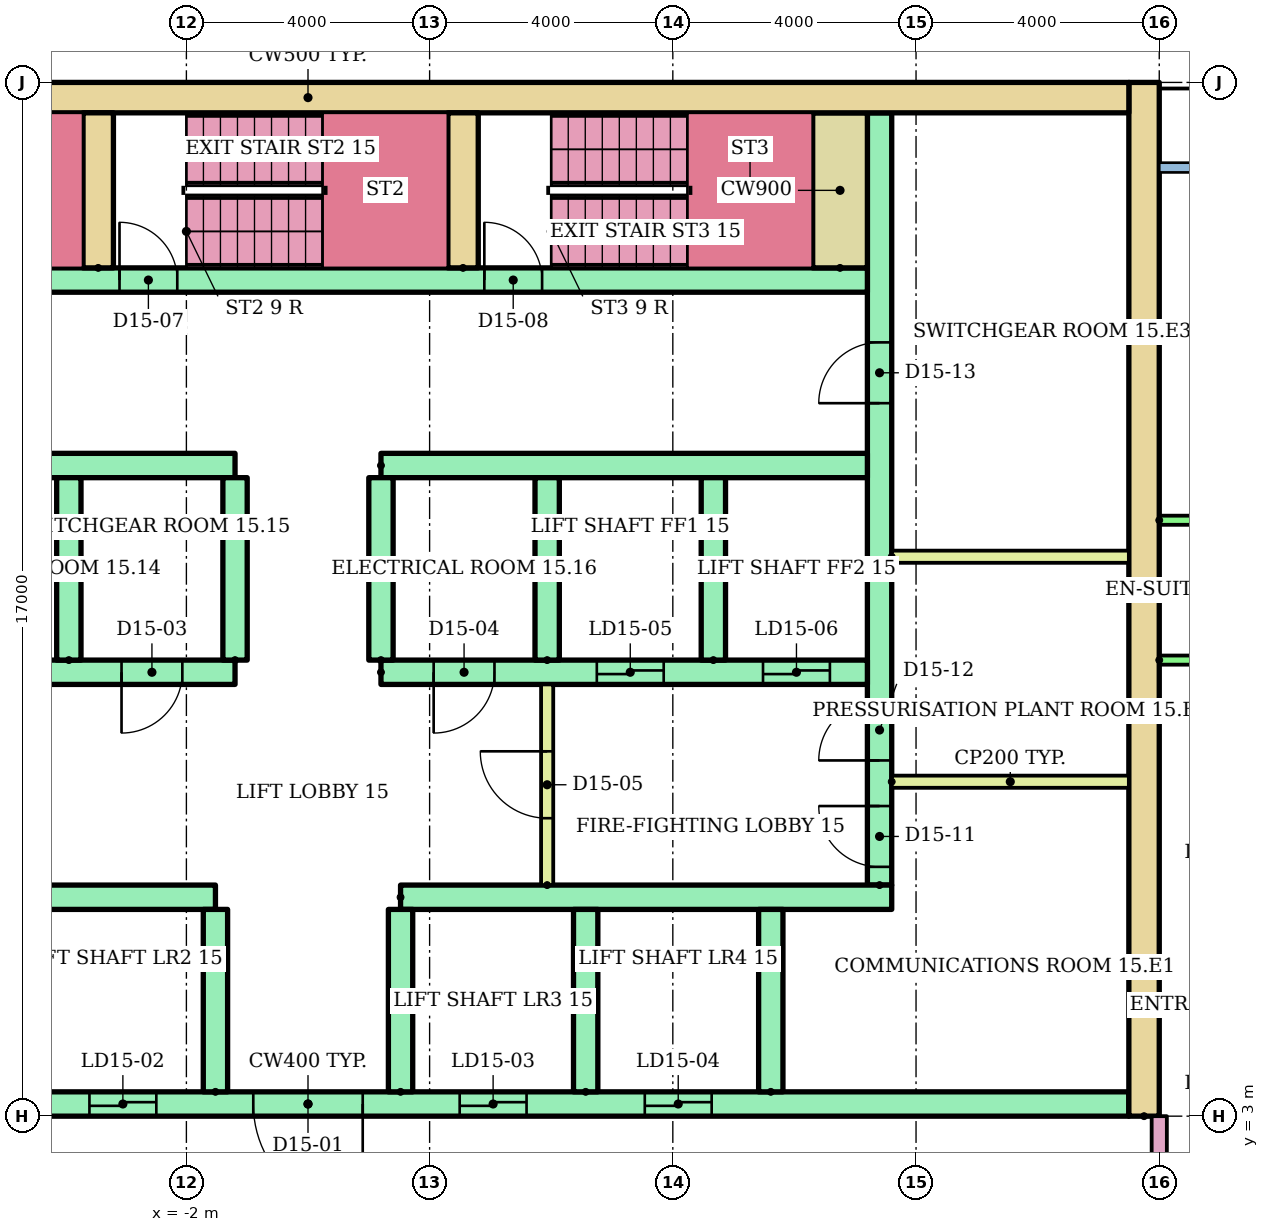
"""IFC4 building model, lengths in metres.
Left out: names, types, materials, properties, quantities, classifications, styles, units other than length and angle.
Written with IfcOpenShell. Run it as: python <this file> out.ifc"""

import sys

from ifc_helpers import new_model, si_unit, direction, frame, frame_2d, origin, place, context, subcontext, project, spatial, rectangle, extrude, element, fill, save


model = new_model("IFC4")
c1 = context("Model", 3, precision=1e-05, world=origin(), true_north=direction((0.0, 1.0)))
c2 = subcontext(c1, "Body", "Model", "MODEL_VIEW")
j1 = project(units=[si_unit("LENGTHUNIT", "METRE"), si_unit("PLANEANGLEUNIT", "RADIAN")], contexts=[c1])
p1 = place(None, origin())
s1 = spatial("IfcSite", under=j1, at=p1, CompositionType="ELEMENT")
p2 = place(p1, origin())
s2 = spatial("IfcBuilding", under=s1, at=p2, CompositionType="ELEMENT")
p3 = place(p2, frame((0.0, 0.0, 57.6)))
s3 = spatial("IfcBuildingStorey", under=s2, at=p3, CompositionType="ELEMENT", Elevation=57.6)
p4 = place(p3, frame((13.75, 3.0, 0.0), z_axis=(0.0, 0.0, 1.0), x_axis=(0.0, 1.0, 0.0)))
e1 = element("IfcWall", 1, at=p4, inside=s3, PredefinedType="SHEAR", context=c2, shape_type="SweptSolid", body=[
    extrude(rectangle(XDim=17.0, YDim=0.5, at=frame_2d((8.5, 0.0))), origin(), (0.0, 0.0, 1.0), 2.92),
])
p5 = place(p3, frame((-13.5, 19.75, 0.0)))
e2 = element("IfcWall", 2, at=p5, inside=s3, PredefinedType="SHEAR", context=c2, shape_type="SweptSolid", body=[
    extrude(rectangle(XDim=27.0, YDim=0.5, at=frame_2d((13.5, 0.0))), origin(), (0.0, 0.0, 1.0), 2.92),
])
p6 = place(p3, frame((9.4, 6.8, 0.0), z_axis=(0.0, 0.0, 1.0), x_axis=(0.0, 1.0, 0.0)))
e3 = element("IfcWall", 3, at=p6, inside=s3, PredefinedType="SHEAR", context=c2, shape_type="SweptSolid", body=[
    extrude(rectangle(XDim=12.7, YDim=0.4, at=frame_2d((6.35, 0.0))), origin(), (0.0, 0.0, 1.0), 2.92),
])
p7 = place(p6, frame((0.3, 0.0, 0.0)))
e4 = element("IfcOpeningElement", 4, at=p7, cuts=e3, PredefinedType="OPENING", context=c2, shape_type="SweptSolid", body=[
    extrude(rectangle(XDim=1.0, YDim=2.1, at=frame_2d((0.5, 1.05))), frame((0.0, 0.21, 0.0), z_axis=(0.0, -1.0, 0.0), x_axis=(1.0, 0.0, 0.0)), (0.0, 0.0, 1.0), 0.42),
])
p8 = place(p6, frame((2.05, 0.0, 0.0)))
e5 = element("IfcOpeningElement", 5, at=p8, cuts=e3, PredefinedType="OPENING", context=c2, shape_type="SweptSolid", body=[
    extrude(rectangle(XDim=1.0, YDim=2.1, at=frame_2d((0.5, 1.05))), frame((0.0, 0.21, 0.0), z_axis=(0.0, -1.0, 0.0), x_axis=(1.0, 0.0, 0.0)), (0.0, 0.0, 1.0), 0.42),
])
p9 = place(p6, frame((7.925, 0.0, 0.0)))
e6 = element("IfcOpeningElement", 6, at=p9, cuts=e3, PredefinedType="OPENING", context=c2, shape_type="SweptSolid", body=[
    extrude(rectangle(XDim=1.0, YDim=2.1, at=frame_2d((0.5, 1.05))), frame((0.0, 0.21, 0.0), z_axis=(0.0, -1.0, 0.0), x_axis=(1.0, 0.0, 0.0)), (0.0, 0.0, 1.0), 0.42),
])
p10 = place(p3, frame((-13.5, 3.2, 0.0)))
e7 = element("IfcWall", 7, at=p10, inside=s3, PredefinedType="SHEAR", context=c2, shape_type="SweptSolid", body=[
    extrude(rectangle(XDim=27.0, YDim=0.4, at=frame_2d((13.5, 0.0))), origin(), (0.0, 0.0, 1.0), 2.92),
])
p11 = place(p10, frame((6.861, 0.0, 0.0)))
e8 = element("IfcOpeningElement", 8, at=p11, cuts=e7, PredefinedType="OPENING", context=c2, shape_type="SweptSolid", body=[
    extrude(rectangle(XDim=1.1, YDim=2.1, at=frame_2d((0.55, 1.05))), frame((0.0, 0.21, 0.0), z_axis=(0.0, -1.0, 0.0), x_axis=(1.0, 0.0, 0.0)), (0.0, 0.0, 1.0), 0.42),
])
p12 = place(p10, frame((9.906, 0.0, 0.0)))
e9 = element("IfcOpeningElement", 9, at=p12, cuts=e7, PredefinedType="OPENING", context=c2, shape_type="SweptSolid", body=[
    extrude(rectangle(XDim=1.1, YDim=2.1, at=frame_2d((0.55, 1.05))), frame((0.0, 0.21, 0.0), z_axis=(0.0, -1.0, 0.0), x_axis=(1.0, 0.0, 0.0)), (0.0, 0.0, 1.0), 0.42),
])
p13 = place(p10, frame((15.994, 0.0, 0.0)))
e10 = element("IfcOpeningElement", 10, at=p13, cuts=e7, PredefinedType="OPENING", context=c2, shape_type="SweptSolid", body=[
    extrude(rectangle(XDim=1.1, YDim=2.1, at=frame_2d((0.55, 1.05))), frame((0.0, 0.21, 0.0), z_axis=(0.0, -1.0, 0.0), x_axis=(1.0, 0.0, 0.0)), (0.0, 0.0, 1.0), 0.42),
])
p14 = place(p10, frame((19.039, 0.0, 0.0)))
e11 = element("IfcOpeningElement", 11, at=p14, cuts=e7, PredefinedType="OPENING", context=c2, shape_type="SweptSolid", body=[
    extrude(rectangle(XDim=1.1, YDim=2.1, at=frame_2d((0.55, 1.05))), frame((0.0, 0.21, 0.0), z_axis=(0.0, -1.0, 0.0), x_axis=(1.0, 0.0, 0.0)), (0.0, 0.0, 1.0), 0.42),
])
p15 = place(p10, frame((12.6, 0.0, 0.0)))
e12 = element("IfcOpeningElement", 12, at=p15, cuts=e7, PredefinedType="OPENING", context=c2, shape_type="SweptSolid", body=[
    extrude(rectangle(XDim=1.8, YDim=2.1, at=frame_2d((0.9, 1.05))), frame((0.0, 0.21, 0.0), z_axis=(0.0, -1.0, 0.0), x_axis=(1.0, 0.0, 0.0)), (0.0, 0.0, 1.0), 0.42),
])
p16 = place(p3, frame((-13.5, 6.6, 0.0)))
e13 = element("IfcWall", 13, at=p16, inside=s3, PredefinedType="SHEAR", context=c2, shape_type="SweptSolid", body=[
    extrude(rectangle(XDim=11.978, YDim=0.4, at=frame_2d((5.989, 0.0))), origin(), (0.0, 0.0, 1.0), 2.92),
])
p17 = place(p3, frame((1.522, 6.6, 0.0)))
e14 = element("IfcWall", 14, at=p17, inside=s3, PredefinedType="SHEAR", context=c2, shape_type="SweptSolid", body=[
    extrude(rectangle(XDim=8.078, YDim=0.4, at=frame_2d((4.039, 0.0))), origin(), (0.0, 0.0, 1.0), 2.92),
])
for number, where, z_axis, x_axis in (
    (15, (-1.522, 3.4, 0.0), (0.0, 0.0, 1.0), (0.0, 1.0, 0.0)),
    (16, (1.522, 3.4, 0.0), (0.0, 0.0, 1.0), (0.0, 1.0, 0.0)),
    (17, (4.567, 3.4, 0.0), (0.0, 0.0, 1.0), (0.0, 1.0, 0.0)),
    (18, (7.611, 3.4, 0.0), (0.0, 0.0, 1.0), (0.0, 1.0, 0.0)),
):
    element("IfcWall", number, at=place(p3, frame(where, z_axis=z_axis, x_axis=x_axis)), inside=s3, PredefinedType="SHEAR", context=c2, shape_type="SweptSolid", body=[
        extrude(rectangle(XDim=3.0, YDim=0.4, at=frame_2d((1.5, 0.0))), origin(), (0.0, 0.0, 1.0), 2.92),
    ])
p18 = place(p3, frame((-9.2, 10.3, 0.0)))
e19 = element("IfcWall", 19, at=p18, inside=s3, PredefinedType="SHEAR", context=c2, shape_type="SweptSolid", body=[
    extrude(rectangle(XDim=8.0, YDim=0.4, at=frame_2d((4.0, 0.0))), origin(), (0.0, 0.0, 1.0), 2.92),
])
p19 = place(p18, frame((2.033, 0.0, 0.0)))
e20 = element("IfcOpeningElement", 20, at=p19, cuts=e19, PredefinedType="OPENING", context=c2, shape_type="SweptSolid", body=[
    extrude(rectangle(XDim=1.0, YDim=2.1, at=frame_2d((0.5, 1.05))), frame((0.0, 0.21, 0.0), z_axis=(0.0, -1.0, 0.0), x_axis=(1.0, 0.0, 0.0)), (0.0, 0.0, 1.0), 0.42),
])
p20 = place(p18, frame((6.133, 0.0, 0.0)))
e21 = element("IfcOpeningElement", 21, at=p20, cuts=e19, PredefinedType="OPENING", context=c2, shape_type="SweptSolid", body=[
    extrude(rectangle(XDim=1.0, YDim=2.1, at=frame_2d((0.5, 1.05))), frame((0.0, 0.21, 0.0), z_axis=(0.0, -1.0, 0.0), x_axis=(1.0, 0.0, 0.0)), (0.0, 0.0, 1.0), 0.42),
])
p21 = place(p3, frame((-9.2, 13.7, 0.0)))
e22 = element("IfcWall", 22, at=p21, inside=s3, PredefinedType="SHEAR", context=c2, shape_type="SweptSolid", body=[
    extrude(rectangle(XDim=8.0, YDim=0.4, at=frame_2d((4.0, 0.0))), origin(), (0.0, 0.0, 1.0), 2.92),
])
p22 = place(p3, frame((1.2, 10.3, 0.0)))
e23 = element("IfcWall", 23, at=p22, inside=s3, PredefinedType="SHEAR", context=c2, shape_type="SweptSolid", body=[
    extrude(rectangle(XDim=8.0, YDim=0.4, at=frame_2d((4.0, 0.0))), origin(), (0.0, 0.0, 1.0), 2.92),
])
p23 = place(p22, frame((3.55, 0.0, 0.0)))
e24 = element("IfcOpeningElement", 24, at=p23, cuts=e23, PredefinedType="OPENING", context=c2, shape_type="SweptSolid", body=[
    extrude(rectangle(XDim=1.1, YDim=2.1, at=frame_2d((0.55, 1.05))), frame((0.0, 0.21, 0.0), z_axis=(0.0, -1.0, 0.0), x_axis=(1.0, 0.0, 0.0)), (0.0, 0.0, 1.0), 0.42),
])
p24 = place(p22, frame((6.283, 0.0, 0.0)))
e25 = element("IfcOpeningElement", 25, at=p24, cuts=e23, PredefinedType="OPENING", context=c2, shape_type="SweptSolid", body=[
    extrude(rectangle(XDim=1.1, YDim=2.1, at=frame_2d((0.55, 1.05))), frame((0.0, 0.21, 0.0), z_axis=(0.0, -1.0, 0.0), x_axis=(1.0, 0.0, 0.0)), (0.0, 0.0, 1.0), 0.42),
])
p25 = place(p22, frame((0.867, 0.0, 0.0)))
e26 = element("IfcOpeningElement", 26, at=p25, cuts=e23, PredefinedType="OPENING", context=c2, shape_type="SweptSolid", body=[
    extrude(rectangle(XDim=1.0, YDim=2.1, at=frame_2d((0.5, 1.05))), frame((0.0, 0.21, 0.0), z_axis=(0.0, -1.0, 0.0), x_axis=(1.0, 0.0, 0.0)), (0.0, 0.0, 1.0), 0.42),
])
p26 = place(p3, frame((1.2, 13.7, 0.0)))
e27 = element("IfcWall", 27, at=p26, inside=s3, PredefinedType="SHEAR", context=c2, shape_type="SweptSolid", body=[
    extrude(rectangle(XDim=8.0, YDim=0.4, at=frame_2d((4.0, 0.0))), origin(), (0.0, 0.0, 1.0), 2.92),
])
for number, where, z_axis, x_axis in (
    (28, (-3.933, 10.5, 0.0), (0.0, 0.0, 1.0), (0.0, 1.0, 0.0)),
    (29, (-1.2, 10.5, 0.0), (0.0, 0.0, 1.0), (0.0, 1.0, 0.0)),
    (30, (1.2, 10.5, 0.0), (0.0, 0.0, 1.0), (0.0, 1.0, 0.0)),
    (31, (3.933, 10.5, 0.0), (0.0, 0.0, 1.0), (0.0, 1.0, 0.0)),
    (32, (6.667, 10.5, 0.0), (0.0, 0.0, 1.0), (0.0, 1.0, 0.0)),
):
    element("IfcWall", number, at=place(p3, frame(where, z_axis=z_axis, x_axis=x_axis)), inside=s3, PredefinedType="SHEAR", context=c2, shape_type="SweptSolid", body=[
        extrude(rectangle(XDim=3.0, YDim=0.4, at=frame_2d((1.5, 0.0))), origin(), (0.0, 0.0, 1.0), 2.92),
    ])
p27 = place(p3, frame((3.933, 6.8, 0.0), z_axis=(0.0, 0.0, 1.0), x_axis=(0.0, 1.0, 0.0)))
e33 = element("IfcWall", 33, at=p27, inside=s3, PredefinedType="PARTITIONING", context=c2, shape_type="SweptSolid", body=[
    extrude(rectangle(XDim=3.3, YDim=0.2, at=frame_2d((1.65, 0.0))), origin(), (0.0, 0.0, 1.0), 2.92),
])
p28 = place(p27, frame((1.1, 0.0, 0.0)))
e34 = element("IfcOpeningElement", 34, at=p28, cuts=e33, PredefinedType="OPENING", context=c2, shape_type="SweptSolid", body=[
    extrude(rectangle(XDim=1.1, YDim=2.1, at=frame_2d((0.55, 1.05))), frame((0.0, 0.11, 0.0), z_axis=(0.0, -1.0, 0.0), x_axis=(1.0, 0.0, 0.0)), (0.0, 0.0, 1.0), 0.22),
])
p29 = place(p3, frame((-9.2, 16.75, 0.0)))
e35 = element("IfcWall", 35, at=p29, inside=s3, PredefinedType="SHEAR", context=c2, shape_type="SweptSolid", body=[
    extrude(rectangle(XDim=18.4, YDim=0.4, at=frame_2d((9.2, 0.0))), origin(), (0.0, 0.0, 1.0), 2.92),
])
p30 = place(p29, frame((0.1, 0.0, 0.0)))
e36 = element("IfcOpeningElement", 36, at=p30, cuts=e35, PredefinedType="OPENING", context=c2, shape_type="SweptSolid", body=[
    extrude(rectangle(XDim=0.95, YDim=2.1, at=frame_2d((0.475, 1.05))), frame((0.0, 0.21, 0.0), z_axis=(0.0, -1.0, 0.0), x_axis=(1.0, 0.0, 0.0)), (0.0, 0.0, 1.0), 0.42),
])
p31 = place(p29, frame((6.1, 0.0, 0.0)))
e37 = element("IfcOpeningElement", 37, at=p31, cuts=e35, PredefinedType="OPENING", context=c2, shape_type="SweptSolid", body=[
    extrude(rectangle(XDim=0.95, YDim=2.1, at=frame_2d((0.475, 1.05))), frame((0.0, 0.21, 0.0), z_axis=(0.0, -1.0, 0.0), x_axis=(1.0, 0.0, 0.0)), (0.0, 0.0, 1.0), 0.42),
])
p32 = place(p29, frame((12.1, 0.0, 0.0)))
e38 = element("IfcOpeningElement", 38, at=p32, cuts=e35, PredefinedType="OPENING", context=c2, shape_type="SweptSolid", body=[
    extrude(rectangle(XDim=0.95, YDim=2.1, at=frame_2d((0.475, 1.05))), frame((0.0, 0.21, 0.0), z_axis=(0.0, -1.0, 0.0), x_axis=(1.0, 0.0, 0.0)), (0.0, 0.0, 1.0), 0.42),
])
for number, where, z_axis, x_axis in (
    (39, (-3.45, 16.95, 0.0), (0.0, 0.0, 1.0), (0.0, 1.0, 0.0)),
    (40, (2.55, 16.95, 0.0), (0.0, 0.0, 1.0), (0.0, 1.0, 0.0)),
):
    element("IfcWall", number, at=place(p3, frame(where, z_axis=z_axis, x_axis=x_axis)), inside=s3, PredefinedType="SHEAR", context=c2, shape_type="SweptSolid", body=[
        extrude(rectangle(XDim=2.55, YDim=0.5, at=frame_2d((1.275, 0.0))), origin(), (0.0, 0.0, 1.0), 2.92),
    ])
p33 = place(p3, frame((8.75, 16.95, 0.0), z_axis=(0.0, 0.0, 1.0), x_axis=(0.0, 1.0, 0.0)))
e41 = element("IfcWall", 41, at=p33, inside=s3, PredefinedType="SHEAR", context=c2, shape_type="SweptSolid", body=[
    extrude(rectangle(XDim=2.55, YDim=0.9, at=frame_2d((1.275, 0.0))), origin(), (0.0, 0.0, 1.0), 2.92),
])
for number, where in (
    (42, (9.6, 8.5, 0.0)),
    (43, (9.6, 12.2, 0.0)),
):
    element("IfcWall", number, at=place(p3, frame(where)), inside=s3, PredefinedType="PARTITIONING", context=c2, shape_type="SweptSolid", body=[
        extrude(rectangle(XDim=3.9, YDim=0.2, at=frame_2d((1.95, 0.0))), origin(), (0.0, 0.0, 1.0), 2.92),
    ])
p34 = place(p3, frame((14.0, 10.5, 0.0)))
e44 = element("IfcWall", 44, at=p34, inside=s3, PredefinedType="PARTITIONING", context=c2, shape_type="SweptSolid", body=[
    extrude(rectangle(XDim=22.51, YDim=0.15, at=frame_2d((11.255, 0.0))), origin(), (0.0, 0.0, 1.0), 2.4),
])
p35 = place(p34, frame((2.21, 0.0, 0.0)))
e45 = element("IfcOpeningElement", 45, at=p35, cuts=e44, PredefinedType="OPENING", context=c2, shape_type="SweptSolid", body=[
    extrude(rectangle(XDim=0.9, YDim=2.1, at=frame_2d((0.45, 1.05))), frame((0.0, 0.085, 0.0), z_axis=(0.0, -1.0, 0.0), x_axis=(1.0, 0.0, 0.0)), (0.0, 0.0, 1.0), 0.17),
])
p36 = place(p34, frame((7.55, 0.0, 0.0)))
e46 = element("IfcOpeningElement", 46, at=p36, cuts=e44, PredefinedType="OPENING", context=c2, shape_type="SweptSolid", body=[
    extrude(rectangle(XDim=0.9, YDim=2.1, at=frame_2d((0.45, 1.05))), frame((0.0, 0.085, 0.0), z_axis=(0.0, -1.0, 0.0), x_axis=(1.0, 0.0, 0.0)), (0.0, 0.0, 1.0), 0.17),
])
p37 = place(p34, frame((16.65, 0.0, 0.0)))
e47 = element("IfcOpeningElement", 47, at=p37, cuts=e44, PredefinedType="OPENING", context=c2, shape_type="SweptSolid", body=[
    extrude(rectangle(XDim=1.0, YDim=2.1, at=frame_2d((0.5, 1.05))), frame((0.0, 0.085, 0.0), z_axis=(0.0, -1.0, 0.0), x_axis=(1.0, 0.0, 0.0)), (0.0, 0.0, 1.0), 0.17),
])
p38 = place(p3, frame((14.0, 12.8, 0.0)))
e48 = element("IfcWall", 48, at=p38, inside=s3, PredefinedType="PARTITIONING", context=c2, shape_type="SweptSolid", body=[
    extrude(rectangle(XDim=2.0, YDim=0.15, at=frame_2d((1.0, 0.0))), origin(), (0.0, 0.0, 1.0), 2.4),
])
p39 = place(p3, frame((14.0, 1.4, 0.0), z_axis=(0.0, 0.0, 1.0), x_axis=(0.0, 1.0, 0.0)))
e49 = element("IfcWall", 49, at=p39, inside=s3, PredefinedType="PARTITIONING", context=c2, shape_type="SweptSolid", body=[
    extrude(rectangle(XDim=1.6, YDim=0.25, at=frame_2d((0.8, 0.0))), origin(), (0.0, 0.0, 1.0), 2.4),
])
p40 = place(p12, origin())
e50 = element("IfcDoor", 50, at=p40, inside=s3, OperationType="SLIDING_TO_LEFT", PredefinedType="DOOR", context=c2, shape_type="SweptSolid", body=[
    extrude(rectangle(XDim=1.1, YDim=2.1, at=frame_2d((0.55, 1.05))), frame((0.0, 0.025, 0.0), z_axis=(0.0, -1.0, 0.0), x_axis=(1.0, 0.0, 0.0)), (0.0, 0.0, 1.0), 0.05),
])
fill(e9, e50)
p41 = place(p13, origin())
e51 = element("IfcDoor", 51, at=p41, inside=s3, OperationType="SLIDING_TO_LEFT", PredefinedType="DOOR", context=c2, shape_type="SweptSolid", body=[
    extrude(rectangle(XDim=1.1, YDim=2.1, at=frame_2d((0.55, 1.05))), frame((0.0, 0.025, 0.0), z_axis=(0.0, -1.0, 0.0), x_axis=(1.0, 0.0, 0.0)), (0.0, 0.0, 1.0), 0.05),
])
fill(e10, e51)
p42 = place(p14, origin())
e52 = element("IfcDoor", 52, at=p42, inside=s3, OperationType="SLIDING_TO_LEFT", PredefinedType="DOOR", context=c2, shape_type="SweptSolid", body=[
    extrude(rectangle(XDim=1.1, YDim=2.1, at=frame_2d((0.55, 1.05))), frame((0.0, 0.025, 0.0), z_axis=(0.0, -1.0, 0.0), x_axis=(1.0, 0.0, 0.0)), (0.0, 0.0, 1.0), 0.05),
])
fill(e11, e52)
p43 = place(p15, frame((1.8, 0.0, 0.0), z_axis=(0.0, 0.0, 1.0), x_axis=(-1.0, 0.0, 0.0)))
e53 = element("IfcDoor", 53, at=p43, inside=s3, OperationType="DOUBLE_DOOR_SINGLE_SWING", PredefinedType="DOOR", context=c2, shape_type="SweptSolid", body=[
    extrude(rectangle(XDim=1.8, YDim=2.1, at=frame_2d((0.9, 1.05))), frame((0.0, 0.025, 0.0), z_axis=(0.0, -1.0, 0.0), x_axis=(1.0, 0.0, 0.0)), (0.0, 0.0, 1.0), 0.05),
])
fill(e12, e53)
p44 = place(p23, origin())
e54 = element("IfcDoor", 54, at=p44, inside=s3, OperationType="SLIDING_TO_LEFT", PredefinedType="DOOR", context=c2, shape_type="SweptSolid", body=[
    extrude(rectangle(XDim=1.1, YDim=2.1, at=frame_2d((0.55, 1.05))), frame((0.0, 0.025, 0.0), z_axis=(0.0, -1.0, 0.0), x_axis=(1.0, 0.0, 0.0)), (0.0, 0.0, 1.0), 0.05),
])
fill(e24, e54)
p45 = place(p24, origin())
e55 = element("IfcDoor", 55, at=p45, inside=s3, OperationType="SLIDING_TO_LEFT", PredefinedType="DOOR", context=c2, shape_type="SweptSolid", body=[
    extrude(rectangle(XDim=1.1, YDim=2.1, at=frame_2d((0.55, 1.05))), frame((0.0, 0.025, 0.0), z_axis=(0.0, -1.0, 0.0), x_axis=(1.0, 0.0, 0.0)), (0.0, 0.0, 1.0), 0.05),
])
fill(e25, e55)
p46 = place(p20, frame((1.0, 0.0, 0.0), z_axis=(0.0, 0.0, 1.0), x_axis=(-1.0, 0.0, 0.0)))
e56 = element("IfcDoor", 56, at=p46, inside=s3, OperationType="SINGLE_SWING_LEFT", PredefinedType="DOOR", context=c2, shape_type="SweptSolid", body=[
    extrude(rectangle(XDim=1.0, YDim=2.1, at=frame_2d((0.5, 1.05))), frame((0.0, 0.025, 0.0), z_axis=(0.0, -1.0, 0.0), x_axis=(1.0, 0.0, 0.0)), (0.0, 0.0, 1.0), 0.05),
])
fill(e21, e56)
p47 = place(p25, frame((1.0, 0.0, 0.0), z_axis=(0.0, 0.0, 1.0), x_axis=(-1.0, 0.0, 0.0)))
e57 = element("IfcDoor", 57, at=p47, inside=s3, OperationType="SINGLE_SWING_LEFT", PredefinedType="DOOR", context=c2, shape_type="SweptSolid", body=[
    extrude(rectangle(XDim=1.0, YDim=2.1, at=frame_2d((0.5, 1.05))), frame((0.0, 0.025, 0.0), z_axis=(0.0, -1.0, 0.0), x_axis=(1.0, 0.0, 0.0)), (0.0, 0.0, 1.0), 0.05),
])
fill(e26, e57)
p48 = place(p28, origin())
e58 = element("IfcDoor", 58, at=p48, inside=s3, OperationType="SINGLE_SWING_RIGHT", PredefinedType="DOOR", context=c2, shape_type="SweptSolid", body=[
    extrude(rectangle(XDim=1.1, YDim=2.1, at=frame_2d((0.55, 1.05))), frame((0.0, 0.025, 0.0), z_axis=(0.0, -1.0, 0.0), x_axis=(1.0, 0.0, 0.0)), (0.0, 0.0, 1.0), 0.05),
])
fill(e34, e58)
p49 = place(p31, origin())
e59 = element("IfcDoor", 59, at=p49, inside=s3, OperationType="SINGLE_SWING_LEFT", PredefinedType="DOOR", context=c2, shape_type="SweptSolid", body=[
    extrude(rectangle(XDim=0.95, YDim=2.1, at=frame_2d((0.475, 1.05))), frame((0.0, 0.025, 0.0), z_axis=(0.0, -1.0, 0.0), x_axis=(1.0, 0.0, 0.0)), (0.0, 0.0, 1.0), 0.05),
])
fill(e37, e59)
p50 = place(p32, origin())
e60 = element("IfcDoor", 60, at=p50, inside=s3, OperationType="SINGLE_SWING_LEFT", PredefinedType="DOOR", context=c2, shape_type="SweptSolid", body=[
    extrude(rectangle(XDim=0.95, YDim=2.1, at=frame_2d((0.475, 1.05))), frame((0.0, 0.025, 0.0), z_axis=(0.0, -1.0, 0.0), x_axis=(1.0, 0.0, 0.0)), (0.0, 0.0, 1.0), 0.05),
])
fill(e38, e60)
p51 = place(p7, origin())
e61 = element("IfcDoor", 61, at=p51, inside=s3, OperationType="SINGLE_SWING_RIGHT", PredefinedType="DOOR", context=c2, shape_type="SweptSolid", body=[
    extrude(rectangle(XDim=1.0, YDim=2.1, at=frame_2d((0.5, 1.05))), frame((0.0, 0.025, 0.0), z_axis=(0.0, -1.0, 0.0), x_axis=(1.0, 0.0, 0.0)), (0.0, 0.0, 1.0), 0.05),
])
fill(e4, e61)
p52 = place(p8, origin())
e62 = element("IfcDoor", 62, at=p52, inside=s3, OperationType="SINGLE_SWING_LEFT", PredefinedType="DOOR", context=c2, shape_type="SweptSolid", body=[
    extrude(rectangle(XDim=1.0, YDim=2.1, at=frame_2d((0.5, 1.05))), frame((0.0, 0.025, 0.0), z_axis=(0.0, -1.0, 0.0), x_axis=(1.0, 0.0, 0.0)), (0.0, 0.0, 1.0), 0.05),
])
fill(e5, e62)
p53 = place(p9, origin())
e63 = element("IfcDoor", 63, at=p53, inside=s3, OperationType="SINGLE_SWING_LEFT", PredefinedType="DOOR", context=c2, shape_type="SweptSolid", body=[
    extrude(rectangle(XDim=1.0, YDim=2.1, at=frame_2d((0.5, 1.05))), frame((0.0, 0.025, 0.0), z_axis=(0.0, -1.0, 0.0), x_axis=(1.0, 0.0, 0.0)), (0.0, 0.0, 1.0), 0.05),
])
fill(e6, e63)
save(model, sys.argv[1])
